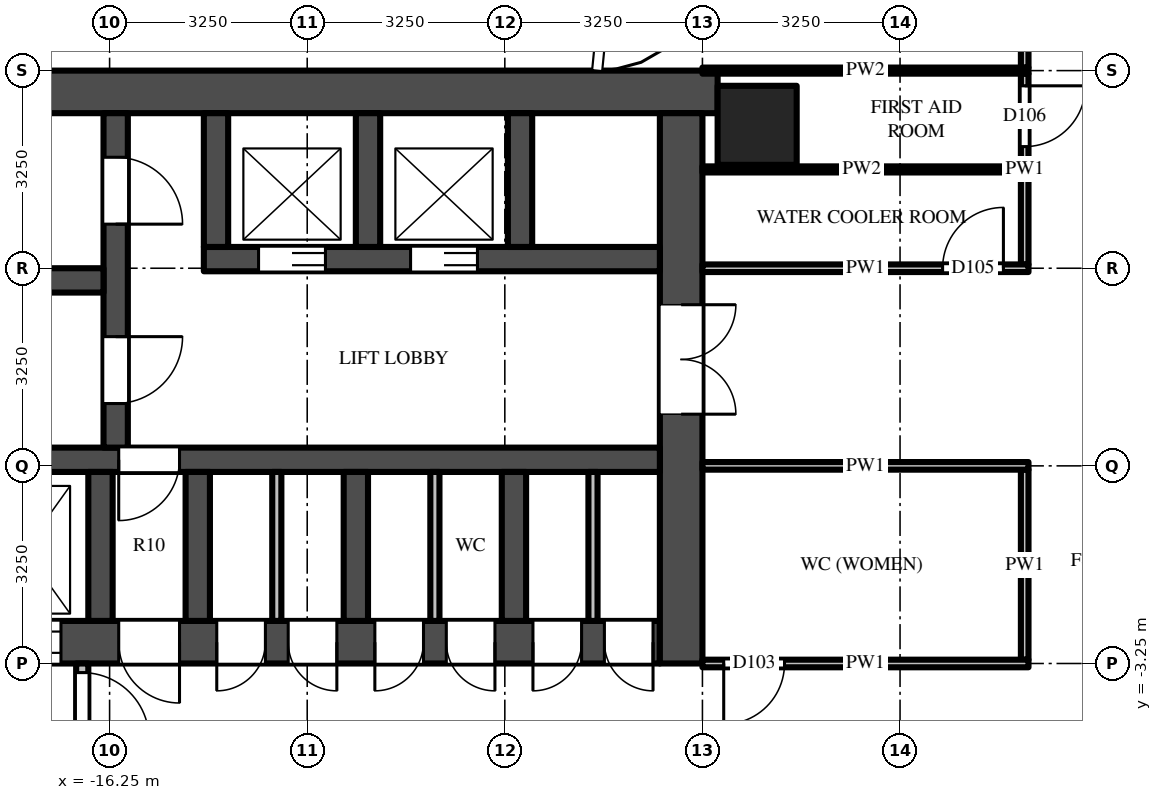
"""IFC4 building model, lengths in metres.
Left out: names, types, materials, properties, quantities, classifications, styles, units other than length and angle.
Written with IfcOpenShell. Run it as: python <this file> out.ifc"""

import sys

from ifc_helpers import new_model, si_unit, direction, frame, frame_2d, origin, origin_2d, place, context, subcontext, project, spatial, rectangle, extrude, source, transform, mapped, element, fill, save


model = new_model("IFC4")
c1 = context("Model", 3, precision=1e-05, world=origin(), true_north=direction((0.0, 1.0)))
c2 = subcontext(c1, "Body", "Model", "MODEL_VIEW")
j1 = project(units=[si_unit("LENGTHUNIT", "METRE"), si_unit("PLANEANGLEUNIT", "RADIAN")], contexts=[c1])
p1 = place(None, origin())
s1 = spatial("IfcSite", under=j1, at=p1, CompositionType="ELEMENT")
p2 = place(p1, origin())
s2 = spatial("IfcBuilding", under=s1, at=p2, CompositionType="ELEMENT")
p3 = place(p2, frame((0.0, 0.0, 115.5)))
s3 = spatial("IfcBuildingStorey", under=s2, at=p3, CompositionType="ELEMENT", Elevation=115.5)
m1 = source(origin(), c2, "Body", "SweptSolid", [
    extrude(rectangle(XDim=1.3, YDim=1.3, at=origin_2d()), origin(), (0.0, 0.0, 1.0), 4.5),
])
p4 = place(p3, frame((-5.6, 5.6, 0.0), z_axis=(0.0, 0.0, 1.0), x_axis=(1.0, 0.0, 0.0)))
e1 = element("IfcColumn", 1, at=p4, inside=s3, PredefinedType="COLUMN", context=c2, shape_type="MappedRepresentation", body=[
    mapped(m1, transform((0.0, 0.0, 0.0))),
])
m2 = source(origin(), c2, "Body", "SweptSolid", [
    extrude(rectangle(XDim=16.5, YDim=0.7, at=frame_2d((8.25, 0.0))), origin(), (0.0, 0.0, 1.0), 4.25),
])
p5 = place(p3, frame((-6.25, 6.15, 0.0), z_axis=(0.0, 0.0, 1.0), x_axis=(-1.0, 0.0, 0.0)))
e2 = element("IfcWall", 2, at=p5, inside=s3, PredefinedType="SHEAR", context=c2, shape_type="MappedRepresentation", body=[
    mapped(m2, transform((0.0, 0.0, 0.0))),
])
m3 = source(origin(), c2, "Body", "SweptSolid", [
    extrude(rectangle(XDim=14.85, YDim=0.7, at=frame_2d((7.425, 0.0))), origin(), (0.0, 0.0, 1.0), 4.25),
])
p6 = place(p3, frame((-7.2, -2.9, 0.0), z_axis=(0.0, 0.0, 1.0), x_axis=(-1.0, 0.0, 0.0)))
e3 = element("IfcWall", 3, at=p6, inside=s3, PredefinedType="SHEAR", context=c2, shape_type="MappedRepresentation", body=[
    mapped(m3, transform((0.0, 0.0, 0.0))),
])
m4 = source(origin(), c2, "Body", "SweptSolid", [
    extrude(rectangle(XDim=1.3, YDim=2.1, at=frame_2d((0.65, 1.05))), frame((0.0, 0.36, 0.0), z_axis=(0.0, -1.0, 0.0), x_axis=(1.0, 0.0, 0.0)), (0.0, 0.0, 1.0), 0.72),
])
p7 = place(p6, frame((12.2, 0.0, 0.0)))
e4 = element("IfcOpeningElement", 4, at=p7, cuts=e3, PredefinedType="OPENING", context=c2, shape_type="MappedRepresentation", body=[
    mapped(m4, transform((0.0, 0.0, 0.0))),
])
m5 = source(origin(), c2, "Body", "SweptSolid", [
    extrude(rectangle(XDim=1.2, YDim=2.1, at=frame_2d((0.6, 1.05))), frame((0.0, 0.36, 0.0), z_axis=(0.0, -1.0, 0.0), x_axis=(1.0, 0.0, 0.0)), (0.0, 0.0, 1.0), 0.72),
])
p8 = place(p6, frame((9.85, 0.0, 0.0)))
e5 = element("IfcOpeningElement", 5, at=p8, cuts=e3, PredefinedType="OPENING", context=c2, shape_type="MappedRepresentation", body=[
    mapped(m5, transform((0.0, 0.0, 0.0))),
])
m6 = source(origin(), c2, "Body", "SweptSolid", [
    extrude(rectangle(XDim=1.0, YDim=2.1, at=frame_2d((0.5, 1.05))), frame((0.0, 0.36, 0.0), z_axis=(0.0, -1.0, 0.0), x_axis=(1.0, 0.0, 0.0)), (0.0, 0.0, 1.0), 0.72),
])
p9 = place(p6, frame((7.9, 0.0, 0.0)))
e6 = element("IfcOpeningElement", 6, at=p9, cuts=e3, PredefinedType="OPENING", context=c2, shape_type="MappedRepresentation", body=[
    mapped(m6, transform((0.0, 0.0, 0.0))),
])
m7 = source(origin(), c2, "Body", "SweptSolid", [
    extrude(rectangle(XDim=0.8, YDim=2.1, at=frame_2d((0.4, 1.05))), frame((0.0, 0.36, 0.0), z_axis=(0.0, -1.0, 0.0), x_axis=(1.0, 0.0, 0.0)), (0.0, 0.0, 1.0), 0.72),
])
p10 = place(p6, frame((0.113, 0.0, 0.0)))
e7 = element("IfcOpeningElement", 7, at=p10, cuts=e3, PredefinedType="OPENING", context=c2, shape_type="MappedRepresentation", body=[
    mapped(m7, transform((0.0, 0.0, 0.0))),
])
p11 = place(p6, frame((1.288, 0.0, 0.0)))
e8 = element("IfcOpeningElement", 8, at=p11, cuts=e3, PredefinedType="OPENING", context=c2, shape_type="MappedRepresentation", body=[
    mapped(m7, transform((0.0, 0.0, 0.0))),
])
p12 = place(p6, frame((2.712, 0.0, 0.0)))
e9 = element("IfcOpeningElement", 9, at=p12, cuts=e3, PredefinedType="OPENING", context=c2, shape_type="MappedRepresentation", body=[
    mapped(m7, transform((0.0, 0.0, 0.0))),
])
p13 = place(p6, frame((3.887, 0.0, 0.0)))
e10 = element("IfcOpeningElement", 10, at=p13, cuts=e3, PredefinedType="OPENING", context=c2, shape_type="MappedRepresentation", body=[
    mapped(m7, transform((0.0, 0.0, 0.0))),
])
p14 = place(p6, frame((5.312, 0.0, 0.0)))
e11 = element("IfcOpeningElement", 11, at=p14, cuts=e3, PredefinedType="OPENING", context=c2, shape_type="MappedRepresentation", body=[
    mapped(m7, transform((0.0, 0.0, 0.0))),
])
p15 = place(p6, frame((6.488, 0.0, 0.0)))
e12 = element("IfcOpeningElement", 12, at=p15, cuts=e3, PredefinedType="OPENING", context=c2, shape_type="MappedRepresentation", body=[
    mapped(m7, transform((0.0, 0.0, 0.0))),
])
m8 = source(origin(), c2, "Body", "SweptSolid", [
    extrude(rectangle(XDim=9.05, YDim=0.7, at=frame_2d((4.525, 0.0))), origin(), (0.0, 0.0, 1.0), 4.25),
])
p16 = place(p3, frame((-6.85, 5.8, 0.0), z_axis=(0.0, 0.0, 1.0), x_axis=(0.0, -1.0, 0.0)))
e13 = element("IfcWall", 13, at=p16, inside=s3, PredefinedType="SHEAR", context=c2, shape_type="MappedRepresentation", body=[
    mapped(m8, transform((0.0, 0.0, 0.0))),
])
m9 = source(origin(), c2, "Body", "SweptSolid", [
    extrude(rectangle(XDim=1.8, YDim=2.1, at=frame_2d((0.9, 1.05))), frame((0.0, 0.36, 0.0), z_axis=(0.0, -1.0, 0.0), x_axis=(1.0, 0.0, 0.0)), (0.0, 0.0, 1.0), 0.72),
])
p17 = place(p16, frame((3.15, 0.0, 0.0)))
e14 = element("IfcOpeningElement", 14, at=p17, cuts=e13, PredefinedType="OPENING", context=c2, shape_type="MappedRepresentation", body=[
    mapped(m9, transform((0.0, 0.0, 0.0))),
])
m10 = source(origin(), c2, "Body", "SweptSolid", [
    extrude(rectangle(XDim=7.5, YDim=0.4, at=frame_2d((3.75, 0.0))), origin(), (0.0, 0.0, 1.0), 4.25),
])
p18 = place(p3, frame((-7.2, 3.4, 0.0), z_axis=(0.0, 0.0, 1.0), x_axis=(-1.0, 0.0, 0.0)))
e15 = element("IfcWall", 15, at=p18, inside=s3, PredefinedType="SHEAR", context=c2, shape_type="MappedRepresentation", body=[
    mapped(m10, transform((0.0, 0.0, 0.0))),
])
m11 = source(origin(), c2, "Body", "SweptSolid", [
    extrude(rectangle(XDim=1.1, YDim=2.1, at=frame_2d((0.55, 1.05))), frame((0.0, 0.21, 0.0), z_axis=(0.0, -1.0, 0.0), x_axis=(1.0, 0.0, 0.0)), (0.0, 0.0, 1.0), 0.42),
])
p19 = place(p18, frame((3.0, 0.0, 0.0)))
e16 = element("IfcOpeningElement", 16, at=p19, cuts=e15, PredefinedType="OPENING", context=c2, shape_type="MappedRepresentation", body=[
    mapped(m11, transform((0.0, 0.0, 0.0))),
])
p20 = place(p18, frame((5.5, 0.0, 0.0)))
e17 = element("IfcOpeningElement", 17, at=p20, cuts=e15, PredefinedType="OPENING", context=c2, shape_type="MappedRepresentation", body=[
    mapped(m11, transform((0.0, 0.0, 0.0))),
])
m12 = source(origin(), c2, "Body", "SweptSolid", [
    extrude(rectangle(XDim=14.85, YDim=0.4, at=frame_2d((7.425, 0.0))), origin(), (0.0, 0.0, 1.0), 4.25),
])
p21 = place(p3, frame((-7.2, 0.1, 0.0), z_axis=(0.0, 0.0, 1.0), x_axis=(-1.0, 0.0, 0.0)))
e18 = element("IfcWall", 18, at=p21, inside=s3, PredefinedType="SHEAR", context=c2, shape_type="MappedRepresentation", body=[
    mapped(m12, transform((0.0, 0.0, 0.0))),
])
m13 = source(origin(), c2, "Body", "SweptSolid", [
    extrude(rectangle(XDim=1.0, YDim=2.1, at=frame_2d((0.5, 1.05))), frame((0.0, 0.21, 0.0), z_axis=(0.0, -1.0, 0.0), x_axis=(1.0, 0.0, 0.0)), (0.0, 0.0, 1.0), 0.42),
])
p22 = place(p21, frame((7.9, 0.0, 0.0)))
e19 = element("IfcOpeningElement", 19, at=p22, cuts=e18, PredefinedType="OPENING", context=c2, shape_type="MappedRepresentation", body=[
    mapped(m13, transform((0.0, 0.0, 0.0))),
])
m14 = source(origin(), c2, "Body", "SweptSolid", [
    extrude(rectangle(XDim=5.5, YDim=0.4, at=frame_2d((2.75, 0.0))), origin(), (0.0, 0.0, 1.0), 4.25),
])
p23 = place(p3, frame((-16.15, 5.8, 0.0), z_axis=(0.0, 0.0, 1.0), x_axis=(0.0, -1.0, 0.0)))
e20 = element("IfcWall", 20, at=p23, inside=s3, PredefinedType="SHEAR", context=c2, shape_type="MappedRepresentation", body=[
    mapped(m14, transform((0.0, 0.0, 0.0))),
])
p24 = place(p23, frame((0.725, 0.0, 0.0)))
e21 = element("IfcOpeningElement", 21, at=p24, cuts=e20, PredefinedType="OPENING", context=c2, shape_type="MappedRepresentation", body=[
    mapped(m11, transform((0.0, 0.0, 0.0))),
])
p25 = place(p23, frame((3.675, 0.0, 0.0)))
e22 = element("IfcOpeningElement", 22, at=p25, cuts=e20, PredefinedType="OPENING", context=c2, shape_type="MappedRepresentation", body=[
    mapped(m11, transform((0.0, 0.0, 0.0))),
])
m15 = source(origin(), c2, "Body", "SweptSolid", [
    extrude(rectangle(XDim=5.7, YDim=0.4, at=frame_2d((2.85, 0.0))), origin(), (0.0, 0.0, 1.0), 4.25),
])
p26 = place(p3, frame((-16.35, 3.05, 0.0), z_axis=(0.0, 0.0, 1.0), x_axis=(-1.0, 0.0, 0.0)))
e23 = element("IfcWall", 23, at=p26, inside=s3, PredefinedType="SHEAR", context=c2, shape_type="MappedRepresentation", body=[
    mapped(m15, transform((0.0, 0.0, 0.0))),
])
m16 = source(origin(), c2, "Body", "SweptSolid", [
    extrude(rectangle(XDim=2.2, YDim=0.4, at=frame_2d((1.1, 0.0))), origin(), (0.0, 0.0, 1.0), 4.25),
])
for number, where, z_axis, x_axis in (
    (24, (-9.5, 5.8, 0.0), (0.0, 0.0, 1.0), (0.0, -1.0, 0.0)),
    (25, (-12.0, 5.8, 0.0), (0.0, 0.0, 1.0), (0.0, -1.0, 0.0)),
    (26, (-14.5, 5.8, 0.0), (0.0, 0.0, 1.0), (0.0, -1.0, 0.0)),
):
    element("IfcWall", number, at=place(p3, frame(where, z_axis=z_axis, x_axis=x_axis)), inside=s3, PredefinedType="SHEAR", context=c2, shape_type="MappedRepresentation", body=[
        mapped(m16, transform((0.0, 0.0, 0.0))),
    ])
m17 = source(origin(), c2, "Body", "SweptSolid", [
    extrude(rectangle(XDim=2.45, YDim=0.4, at=frame_2d((1.225, 0.0))), origin(), (0.0, 0.0, 1.0), 4.25),
])
for number, where, z_axis, x_axis in (
    (27, (-9.6, -0.1, 0.0), (0.0, 0.0, 1.0), (0.0, -1.0, 0.0)),
    (28, (-12.2, -0.1, 0.0), (0.0, 0.0, 1.0), (0.0, -1.0, 0.0)),
    (29, (-14.8, -0.1, 0.0), (0.0, 0.0, 1.0), (0.0, -1.0, 0.0)),
    (30, (-16.4, -0.1, 0.0), (0.0, 0.0, 1.0), (0.0, -1.0, 0.0)),
):
    element("IfcWall", number, at=place(p3, frame(where, z_axis=z_axis, x_axis=x_axis)), inside=s3, PredefinedType="SHEAR", context=c2, shape_type="MappedRepresentation", body=[
        mapped(m17, transform((0.0, 0.0, 0.0))),
    ])
m18 = source(origin(), c2, "Body", "SweptSolid", [
    extrude(rectangle(XDim=3.25, YDim=0.2, at=frame_2d((1.625, 0.0))), origin(), (0.0, 0.0, 1.0), 4.25),
])
p27 = place(p3, frame((-16.7, -3.25, 0.0), z_axis=(0.0, 0.0, 1.0), x_axis=(0.0, -1.0, 0.0)))
e31 = element("IfcWall", 31, at=p27, inside=s3, PredefinedType="PARTITIONING", context=c2, shape_type="MappedRepresentation", body=[
    mapped(m18, transform((0.0, 0.0, 0.0))),
])
m19 = source(origin(), c2, "Body", "SweptSolid", [
    extrude(rectangle(XDim=1.1, YDim=2.1, at=frame_2d((0.55, 1.05))), frame((0.0, 0.11, 0.0), z_axis=(0.0, -1.0, 0.0), x_axis=(1.0, 0.0, 0.0)), (0.0, 0.0, 1.0), 0.22),
])
p28 = place(p27, frame((0.15, 0.0, 0.0)))
e32 = element("IfcOpeningElement", 32, at=p28, cuts=e31, PredefinedType="OPENING", context=c2, shape_type="MappedRepresentation", body=[
    mapped(m19, transform((0.0, 0.0, 0.0))),
])
m20 = source(origin(), c2, "Body", "SweptSolid", [
    extrude(rectangle(XDim=2.45, YDim=0.15, at=frame_2d((1.225, 0.0))), origin(), (0.0, 0.0, 1.0), 4.25),
])
for number, where, z_axis, x_axis in (
    (33, (-8.3, -0.1, 0.0), (0.0, 0.0, 1.0), (0.0, -1.0, 0.0)),
    (34, (-10.9, -0.1, 0.0), (0.0, 0.0, 1.0), (0.0, -1.0, 0.0)),
    (35, (-13.5, -0.1, 0.0), (0.0, 0.0, 1.0), (0.0, -1.0, 0.0)),
):
    element("IfcWall", number, at=place(p3, frame(where, z_axis=z_axis, x_axis=x_axis)), inside=s3, PredefinedType="PARTITIONING", context=c2, shape_type="MappedRepresentation", body=[
        mapped(m20, transform((0.0, 0.0, 0.0))),
    ])
m21 = source(origin(), c2, "Body", "SweptSolid", [
    extrude(rectangle(XDim=3.125, YDim=0.125, at=frame_2d((1.562, 0.0))), origin(), (0.0, 0.0, 1.0), 3.546),
])
p29 = place(p3, frame((-1.2, -0.062, 0.0), z_axis=(0.0, 0.0, 1.0), x_axis=(0.0, -1.0, 0.0)))
e36 = element("IfcWall", 36, at=p29, inside=s3, PredefinedType="PARTITIONING", context=c2, shape_type="MappedRepresentation", body=[
    mapped(m21, transform((0.0, 0.0, 0.0))),
])
m22 = source(origin(), c2, "Body", "SweptSolid", [
    extrude(rectangle(XDim=3.137, YDim=0.125, at=frame_2d((1.569, 0.0))), origin(), (0.0, 0.0, 1.0), 3.468),
])
p30 = place(p3, frame((-1.2, 6.45, 0.0), z_axis=(0.0, 0.0, 1.0), x_axis=(0.0, -1.0, 0.0)))
e37 = element("IfcWall", 37, at=p30, inside=s3, PredefinedType="PARTITIONING", context=c2, shape_type="MappedRepresentation", body=[
    mapped(m22, transform((0.0, 0.0, 0.0))),
])
m23 = source(origin(), c2, "Body", "SweptSolid", [
    extrude(rectangle(XDim=1.0, YDim=2.1, at=frame_2d((0.5, 1.05))), frame((0.0, 0.073, 0.0), z_axis=(0.0, -1.0, 0.0), x_axis=(1.0, 0.0, 0.0)), (0.0, 0.0, 1.0), 0.145),
])
p31 = place(p30, frame((0.2, 0.0, 0.0)))
e38 = element("IfcOpeningElement", 38, at=p31, cuts=e37, PredefinedType="OPENING", context=c2, shape_type="MappedRepresentation", body=[
    mapped(m23, transform((0.0, 0.0, 0.0))),
])
m24 = source(origin(), c2, "Body", "SweptSolid", [
    extrude(rectangle(XDim=5.488, YDim=0.125, at=frame_2d((2.744, 0.0))), origin(), (0.0, 0.0, 1.0), 3.468),
])
p32 = place(p3, frame((-1.2, 6.55, 0.0), z_axis=(0.0, 0.0, 1.0), x_axis=(0.0, 1.0, 0.0)))
e39 = element("IfcWall", 39, at=p32, inside=s3, PredefinedType="PARTITIONING", context=c2, shape_type="MappedRepresentation", body=[
    mapped(m24, transform((0.0, 0.0, 0.0))),
])
m25 = source(origin(), c2, "Body", "SweptSolid", [
    extrude(rectangle(XDim=1.2, YDim=2.1, at=frame_2d((0.6, 1.05))), frame((0.0, 0.073, 0.0), z_axis=(0.0, -1.0, 0.0), x_axis=(1.0, 0.0, 0.0)), (0.0, 0.0, 1.0), 0.145),
])
p33 = place(p32, frame((0.3, 0.0, 0.0)))
e40 = element("IfcOpeningElement", 40, at=p33, cuts=e39, PredefinedType="OPENING", context=c2, shape_type="MappedRepresentation", body=[
    mapped(m25, transform((0.0, 0.0, 0.0))),
])
m26 = source(origin(), c2, "Body", "SweptSolid", [
    extrude(rectangle(XDim=5.363, YDim=0.125, at=frame_2d((2.681, 0.0))), origin(), (0.0, 0.0, 1.0), 3.468),
])
p34 = place(p3, frame((-1.137, -3.25, 0.0), z_axis=(0.0, 0.0, 1.0), x_axis=(-1.0, 0.0, 0.0)))
e41 = element("IfcWall", 41, at=p34, inside=s3, PredefinedType="PARTITIONING", context=c2, shape_type="MappedRepresentation", body=[
    mapped(m26, transform((0.0, 0.0, 0.0))),
])
p35 = place(p34, frame((4.012, 0.0, 0.0)))
e42 = element("IfcOpeningElement", 42, at=p35, cuts=e41, PredefinedType="OPENING", context=c2, shape_type="MappedRepresentation", body=[
    mapped(m23, transform((0.0, 0.0, 0.0))),
])
p36 = place(p3, frame((-1.137, 0.0, 0.0), z_axis=(0.0, 0.0, 1.0), x_axis=(-1.0, 0.0, 0.0)))
e43 = element("IfcWall", 43, at=p36, inside=s3, PredefinedType="PARTITIONING", context=c2, shape_type="MappedRepresentation", body=[
    mapped(m26, transform((0.0, 0.0, 0.0))),
])
p37 = place(p3, frame((-6.5, 3.25, 0.0), z_axis=(0.0, 0.0, 1.0), x_axis=(1.0, 0.0, 0.0)))
e44 = element("IfcWall", 44, at=p37, inside=s3, PredefinedType="PARTITIONING", context=c2, shape_type="MappedRepresentation", body=[
    mapped(m26, transform((0.0, 0.0, 0.0))),
])
p38 = place(p37, frame((3.95, 0.0, 0.0)))
e45 = element("IfcOpeningElement", 45, at=p38, cuts=e44, PredefinedType="OPENING", context=c2, shape_type="MappedRepresentation", body=[
    mapped(m23, transform((0.0, 0.0, 0.0))),
])
m27 = source(origin(), c2, "Body", "SweptSolid", [
    extrude(rectangle(XDim=5.238, YDim=0.1, at=frame_2d((2.619, 0.0))), origin(), (0.0, 0.0, 1.0), 3.468),
])
p39 = place(p3, frame((-6.5, 4.875, 0.0), z_axis=(0.0, 0.0, 1.0), x_axis=(1.0, 0.0, 0.0)))
e46 = element("IfcWall", 46, at=p39, inside=s3, PredefinedType="PARTITIONING", context=c2, shape_type="MappedRepresentation", body=[
    mapped(m27, transform((0.0, 0.0, 0.0))),
])
m28 = source(origin(), c2, "Body", "SweptSolid", [
    extrude(rectangle(XDim=5.363, YDim=0.1, at=frame_2d((2.681, 0.0))), origin(), (0.0, 0.0, 1.0), 3.33),
])
p40 = place(p3, frame((-6.5, 6.5, 0.0), z_axis=(0.0, 0.0, 1.0), x_axis=(1.0, 0.0, 0.0)))
e47 = element("IfcWall", 47, at=p40, inside=s3, PredefinedType="PARTITIONING", context=c2, shape_type="MappedRepresentation", body=[
    mapped(m28, transform((0.0, 0.0, 0.0))),
])
m29 = source(origin(), c2, "Body", "SweptSolid", [
    extrude(rectangle(XDim=1.1, YDim=2.1, at=frame_2d((0.55, 1.05))), frame((0.0, 0.025, 0.0), z_axis=(0.0, -1.0, 0.0), x_axis=(1.0, 0.0, 0.0)), (0.0, 0.0, 1.0), 0.05),
])
p41 = place(p19, origin())
e48 = element("IfcDoor", 48, at=p41, inside=s3, OperationType="DOUBLE_DOOR_SLIDING", PredefinedType="DOOR", context=c2, shape_type="MappedRepresentation", body=[
    mapped(m29, transform((0.0, 0.0, 0.0))),
])
fill(e16, e48)
p42 = place(p20, origin())
e49 = element("IfcDoor", 49, at=p42, inside=s3, OperationType="DOUBLE_DOOR_SLIDING", PredefinedType="DOOR", context=c2, shape_type="MappedRepresentation", body=[
    mapped(m29, transform((0.0, 0.0, 0.0))),
])
fill(e17, e49)
m30 = source(origin(), c2, "Body", "SweptSolid", [
    extrude(rectangle(XDim=1.2, YDim=2.1, at=frame_2d((0.6, 1.05))), frame((0.0, -0.275, 0.0), z_axis=(0.0, -1.0, 0.0), x_axis=(1.0, 0.0, 0.0)), (0.0, 0.0, 1.0), 0.05),
])
p43 = place(p8, origin())
e50 = element("IfcDoor", 50, at=p43, inside=s3, OperationType="DOUBLE_DOOR_SLIDING", PredefinedType="DOOR", context=c2, shape_type="MappedRepresentation", body=[
    mapped(m30, transform((0.0, 0.0, 0.0))),
])
fill(e5, e50)
m31 = source(origin(), c2, "Body", "SweptSolid", [
    extrude(rectangle(XDim=1.8, YDim=2.1, at=frame_2d((0.9, 1.05))), frame((0.0, -0.275, 0.0), z_axis=(0.0, -1.0, 0.0), x_axis=(1.0, 0.0, 0.0)), (0.0, 0.0, 1.0), 0.05),
])
p44 = place(p17, origin())
e51 = element("IfcDoor", 51, at=p44, inside=s3, OperationType="DOUBLE_DOOR_SINGLE_SWING", PredefinedType="DOOR", context=c2, shape_type="MappedRepresentation", body=[
    mapped(m31, transform((0.0, 0.0, 0.0))),
])
fill(e14, e51)
p45 = place(p24, origin())
e52 = element("IfcDoor", 52, at=p45, inside=s3, OperationType="SINGLE_SWING_RIGHT", PredefinedType="DOOR", context=c2, shape_type="MappedRepresentation", body=[
    mapped(m29, transform((0.0, 0.0, 0.0))),
])
fill(e21, e52)
p46 = place(p25, origin())
e53 = element("IfcDoor", 53, at=p46, inside=s3, OperationType="SINGLE_SWING_LEFT", PredefinedType="DOOR", context=c2, shape_type="MappedRepresentation", body=[
    mapped(m29, transform((0.0, 0.0, 0.0))),
])
fill(e22, e53)
m32 = source(origin(), c2, "Body", "SweptSolid", [
    extrude(rectangle(XDim=1.0, YDim=2.1, at=frame_2d((0.5, 1.05))), frame((0.0, 0.025, 0.0), z_axis=(0.0, -1.0, 0.0), x_axis=(1.0, 0.0, 0.0)), (0.0, 0.0, 1.0), 0.05),
])
p47 = place(p22, origin())
e54 = element("IfcDoor", 54, at=p47, inside=s3, OperationType="SINGLE_SWING_RIGHT", PredefinedType="DOOR", context=c2, shape_type="MappedRepresentation", body=[
    mapped(m32, transform((0.0, 0.0, 0.0))),
])
fill(e19, e54)
m33 = source(origin(), c2, "Body", "SweptSolid", [
    extrude(rectangle(XDim=1.0, YDim=2.1, at=frame_2d((0.5, 1.05))), frame((0.0, -0.275, 0.0), z_axis=(0.0, -1.0, 0.0), x_axis=(1.0, 0.0, 0.0)), (0.0, 0.0, 1.0), 0.05),
])
p48 = place(p9, origin())
e55 = element("IfcDoor", 55, at=p48, inside=s3, OperationType="SINGLE_SWING_LEFT", PredefinedType="DOOR", context=c2, shape_type="MappedRepresentation", body=[
    mapped(m33, transform((0.0, 0.0, 0.0))),
])
fill(e6, e55)
p49 = place(p28, origin())
e56 = element("IfcDoor", 56, at=p49, inside=s3, OperationType="SINGLE_SWING_RIGHT", PredefinedType="DOOR", context=c2, shape_type="MappedRepresentation", body=[
    mapped(m29, transform((0.0, 0.0, 0.0))),
])
fill(e32, e56)
m34 = source(origin(), c2, "Body", "SweptSolid", [
    extrude(rectangle(XDim=0.8, YDim=2.1, at=frame_2d((0.4, 1.05))), frame((0.0, -0.275, 0.0), z_axis=(0.0, -1.0, 0.0), x_axis=(1.0, 0.0, 0.0)), (0.0, 0.0, 1.0), 0.05),
])
p50 = place(p10, origin())
e57 = element("IfcDoor", 57, at=p50, inside=s3, OperationType="SINGLE_SWING_LEFT", PredefinedType="DOOR", context=c2, shape_type="MappedRepresentation", body=[
    mapped(m34, transform((0.0, 0.0, 0.0))),
])
fill(e7, e57)
p51 = place(p11, origin())
e58 = element("IfcDoor", 58, at=p51, inside=s3, OperationType="SINGLE_SWING_RIGHT", PredefinedType="DOOR", context=c2, shape_type="MappedRepresentation", body=[
    mapped(m34, transform((0.0, 0.0, 0.0))),
])
fill(e8, e58)
p52 = place(p12, origin())
e59 = element("IfcDoor", 59, at=p52, inside=s3, OperationType="SINGLE_SWING_LEFT", PredefinedType="DOOR", context=c2, shape_type="MappedRepresentation", body=[
    mapped(m34, transform((0.0, 0.0, 0.0))),
])
fill(e9, e59)
p53 = place(p13, origin())
e60 = element("IfcDoor", 60, at=p53, inside=s3, OperationType="SINGLE_SWING_RIGHT", PredefinedType="DOOR", context=c2, shape_type="MappedRepresentation", body=[
    mapped(m34, transform((0.0, 0.0, 0.0))),
])
fill(e10, e60)
p54 = place(p14, origin())
e61 = element("IfcDoor", 61, at=p54, inside=s3, OperationType="SINGLE_SWING_LEFT", PredefinedType="DOOR", context=c2, shape_type="MappedRepresentation", body=[
    mapped(m34, transform((0.0, 0.0, 0.0))),
])
fill(e11, e61)
p55 = place(p15, origin())
e62 = element("IfcDoor", 62, at=p55, inside=s3, OperationType="SINGLE_SWING_RIGHT", PredefinedType="DOOR", context=c2, shape_type="MappedRepresentation", body=[
    mapped(m34, transform((0.0, 0.0, 0.0))),
])
fill(e12, e62)
p56 = place(p35, origin())
e63 = element("IfcDoor", 63, at=p56, inside=s3, OperationType="SINGLE_SWING_RIGHT", PredefinedType="DOOR", context=c2, shape_type="MappedRepresentation", body=[
    mapped(m32, transform((0.0, 0.0, 0.0))),
])
fill(e42, e63)
p57 = place(p38, origin())
e64 = element("IfcDoor", 64, at=p57, inside=s3, OperationType="SINGLE_SWING_RIGHT", PredefinedType="DOOR", context=c2, shape_type="MappedRepresentation", body=[
    mapped(m32, transform((0.0, 0.0, 0.0))),
])
fill(e45, e64)
p58 = place(p31, origin())
e65 = element("IfcDoor", 65, at=p58, inside=s3, OperationType="SINGLE_SWING_LEFT", PredefinedType="DOOR", context=c2, shape_type="MappedRepresentation", body=[
    mapped(m32, transform((0.0, 0.0, 0.0))),
])
fill(e38, e65)
save(model, sys.argv[1])
